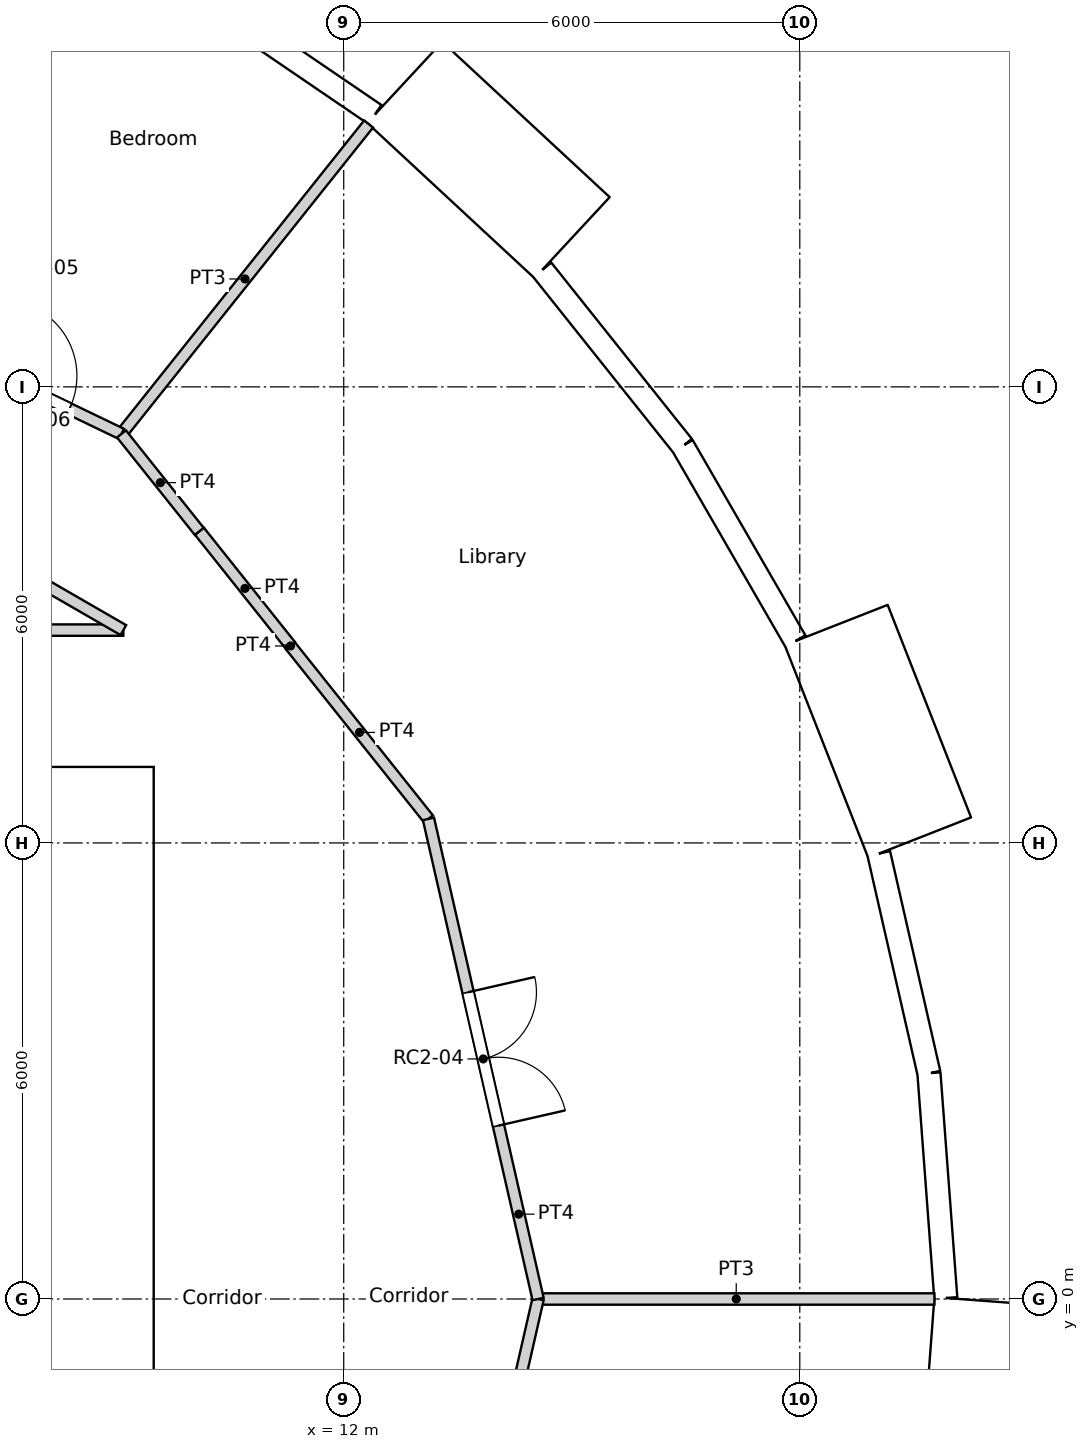
"""IFC4 building model, lengths in metres.
Left out: names, types, materials, properties, quantities, classifications, styles, units other than length and angle.
Written with IfcOpenShell. Run it as: python <this file> out.ifc"""

import sys

from ifc_helpers import new_model, si_unit, direction, frame, frame_2d, origin, origin_2d, place, context, subcontext, project, spatial, rectangle, circle, extrude, element, fill, save


model = new_model("IFC4")
c1 = context("Model", 3, precision=1e-05, world=origin(), true_north=direction((0.0, 1.0)))
c2 = subcontext(c1, "Body", "Model", "MODEL_VIEW")
j1 = project(units=[si_unit("LENGTHUNIT", "METRE"), si_unit("PLANEANGLEUNIT", "RADIAN")], contexts=[c1])
p1 = place(None, origin())
s1 = spatial("IfcSite", under=j1, at=p1, CompositionType="ELEMENT")
p2 = place(p1, origin())
s2 = spatial("IfcBuilding", under=s1, at=p2, CompositionType="ELEMENT")
p3 = place(p2, frame((0.0, 0.0, 241.8)))
s3 = spatial("IfcBuildingStorey", under=s2, at=p3, CompositionType="ELEMENT", Elevation=241.8)
for number, where, z_axis, x_axis in (
    (1, (18.822, 0.0, 0.0), (0.0, 0.0, 1.0), (1.0, 0.0, 0.0)),
    (2, (17.986, 5.548, 0.0), (0.0, 0.0, 1.0), (1.0, 0.0, 0.0)),
    (3, (15.552, 10.603, 0.0), (0.0, 0.0, 1.0), (1.0, 0.0, 0.0)),
    (4, (11.735, 14.716, 0.0), (0.0, 0.0, 1.0), (1.0, 0.0, 0.0)),
):
    element("IfcColumn", number, at=place(p3, frame(where, z_axis=z_axis, x_axis=x_axis)), inside=s3, PredefinedType="COLUMN", context=c2, shape_type="SweptSolid", body=[
        extrude(circle(Radius=0.55, at=origin_2d()), origin(), (0.0, 0.0, 1.0), 3.6),
    ])
p4 = place(p3, frame((19.921, 0.015, 0.0), z_axis=(0.0, 0.0, 1.0), x_axis=(-0.07474897196, 0.997202382263, 0.0)))
e5 = element("IfcWall", 5, at=p4, inside=s3, PredefinedType="SOLIDWALL", context=c2, shape_type="SweptSolid", body=[
    extrude(rectangle(XDim=2.962, YDim=0.3, at=frame_2d((1.481, 0.0))), origin(), (0.0, 0.0, 1.0), 3.25),
])
p5 = place(p4, frame((1.481, 0.0, 1.55)))
e6 = element("IfcOpeningElement", 6, at=p5, cuts=e5, PredefinedType="OPENING", context=c2, shape_type="SweptSolid", body=[
    extrude(circle(Radius=0.9, at=origin_2d()), frame((0.0, 0.16, 0.0), z_axis=(0.0, -1.0, 0.0), x_axis=(1.0, 0.0, 0.0)), (0.0, 0.0, 1.0), 0.32),
])
p6 = place(p3, frame((19.699, 2.969, 0.0), z_axis=(0.0, 0.0, 1.0), x_axis=(-0.222529389789, 0.974925982155, 0.0)))
e7 = element("IfcWall", 7, at=p6, inside=s3, PredefinedType="SOLIDWALL", context=c2, shape_type="SweptSolid", body=[
    extrude(rectangle(XDim=2.962, YDim=0.3, at=frame_2d((1.481, 0.0))), origin(), (0.0, 0.0, 1.0), 3.25),
])
p7 = place(p6, frame((1.481, 0.0, 1.55)))
e8 = element("IfcOpeningElement", 8, at=p7, cuts=e7, PredefinedType="OPENING", context=c2, shape_type="SweptSolid", body=[
    extrude(circle(Radius=0.9, at=origin_2d()), frame((0.0, 0.16, 0.0), z_axis=(0.0, -1.0, 0.0), x_axis=(1.0, 0.0, 0.0)), (0.0, 0.0, 1.0), 0.32),
])
p8 = place(p3, frame((19.576, 6.072, -0.35), z_axis=(0.0, 0.0, 1.0), x_axis=(-0.36537792632, 0.93085926485, 0.0)))
e9 = element("IfcWall", 9, at=p8, inside=s3, PredefinedType="ELEMENTEDWALL", context=c2, shape_type="SweptSolid", body=[
    extrude(rectangle(XDim=3.0, YDim=1.45, at=frame_2d((1.5, 0.0))), origin(), (0.0, 0.0, 1.0), 3.6),
])
p9 = place(p8, frame((1.5, 0.0, 1.9)))
e10 = element("IfcOpeningElement", 10, at=p9, cuts=e9, PredefinedType="OPENING", context=c2, shape_type="SweptSolid", body=[
    extrude(circle(Radius=0.9, at=origin_2d()), frame((0.0, 0.735, 0.0), z_axis=(0.0, -1.0, 0.0), x_axis=(1.0, 0.0, 0.0)), (0.0, 0.0, 1.0), 1.47),
])
p10 = place(p3, frame((17.941, 8.657, 0.0), z_axis=(0.0, 0.0, 1.0), x_axis=(-0.499950756475, 0.86605383268, 0.0)))
e11 = element("IfcWall", 11, at=p10, inside=s3, PredefinedType="SOLIDWALL", context=c2, shape_type="SweptSolid", body=[
    extrude(rectangle(XDim=2.962, YDim=0.3, at=frame_2d((1.481, 0.0))), origin(), (0.0, 0.0, 1.0), 3.25),
])
p11 = place(p10, frame((1.481, 0.0, 1.55)))
e12 = element("IfcOpeningElement", 12, at=p11, cuts=e11, PredefinedType="OPENING", context=c2, shape_type="SweptSolid", body=[
    extrude(circle(Radius=0.9, at=origin_2d()), frame((0.0, 0.16, 0.0), z_axis=(0.0, -1.0, 0.0), x_axis=(1.0, 0.0, 0.0)), (0.0, 0.0, 1.0), 0.32),
])
p12 = place(p3, frame((16.46, 11.222, 0.0), z_axis=(0.0, 0.0, 1.0), x_axis=(-0.623498236992, 0.781824755599, 0.0)))
e13 = element("IfcWall", 13, at=p12, inside=s3, PredefinedType="SOLIDWALL", context=c2, shape_type="SweptSolid", body=[
    extrude(rectangle(XDim=2.962, YDim=0.3, at=frame_2d((1.481, 0.0))), origin(), (0.0, 0.0, 1.0), 3.25),
])
p13 = place(p12, frame((1.481, 0.0, 1.55)))
e14 = element("IfcOpeningElement", 14, at=p13, cuts=e13, PredefinedType="OPENING", context=c2, shape_type="SweptSolid", body=[
    extrude(circle(Radius=0.9, at=origin_2d()), frame((0.0, 0.16, 0.0), z_axis=(0.0, -1.0, 0.0), x_axis=(1.0, 0.0, 0.0)), (0.0, 0.0, 1.0), 0.32),
])
p14 = place(p3, frame((15.003, 13.964, -0.35), z_axis=(0.0, 0.0, 1.0), x_axis=(-0.733022439167, 0.680204457261, 0.0)))
e15 = element("IfcWall", 15, at=p14, inside=s3, PredefinedType="ELEMENTEDWALL", context=c2, shape_type="SweptSolid", body=[
    extrude(rectangle(XDim=3.0, YDim=1.45, at=frame_2d((1.5, 0.0))), origin(), (0.0, 0.0, 1.0), 3.6),
])
p15 = place(p14, frame((1.5, 0.0, 1.9)))
e16 = element("IfcOpeningElement", 16, at=p15, cuts=e15, PredefinedType="OPENING", context=c2, shape_type="SweptSolid", body=[
    extrude(circle(Radius=0.9, at=origin_2d()), frame((0.0, 0.735, 0.0), z_axis=(0.0, -1.0, 0.0), x_axis=(1.0, 0.0, 0.0)), (0.0, 0.0, 1.0), 1.47),
])
p16 = place(p3, frame((12.408, 15.584, 0.0), z_axis=(0.0, 0.0, 1.0), x_axis=(-0.826236061068, 0.563324037646, 0.0)))
e17 = element("IfcWall", 17, at=p16, inside=s3, PredefinedType="SOLIDWALL", context=c2, shape_type="SweptSolid", body=[
    extrude(rectangle(XDim=2.962, YDim=0.3, at=frame_2d((1.481, 0.0))), origin(), (0.0, 0.0, 1.0), 3.25),
])
p17 = place(p16, frame((1.481, 0.0, 1.55)))
e18 = element("IfcOpeningElement", 18, at=p17, cuts=e17, PredefinedType="OPENING", context=c2, shape_type="SweptSolid", body=[
    extrude(circle(Radius=0.9, at=origin_2d()), frame((0.0, 0.16, 0.0), z_axis=(0.0, -1.0, 0.0), x_axis=(1.0, 0.0, 0.0)), (0.0, 0.0, 1.0), 0.32),
])
p18 = place(p3, frame((20.272, -3.023, -0.35), z_axis=(0.0, 0.0, 1.0), x_axis=(0.074785902127, 0.997199613339, 0.0)))
e19 = element("IfcWall", 19, at=p18, inside=s3, PredefinedType="ELEMENTEDWALL", context=c2, shape_type="SweptSolid", body=[
    extrude(rectangle(XDim=3.0, YDim=1.45, at=frame_2d((1.5, 0.0))), origin(), (0.0, 0.0, 1.0), 3.6),
])
p19 = place(p18, frame((1.5, 0.0, 1.9)))
e20 = element("IfcOpeningElement", 20, at=p19, cuts=e19, PredefinedType="OPENING", context=c2, shape_type="SweptSolid", body=[
    extrude(circle(Radius=0.9, at=origin_2d()), frame((0.0, 0.735, 0.0), z_axis=(0.0, -1.0, 0.0), x_axis=(1.0, 0.0, 0.0)), (0.0, 0.0, 1.0), 1.47),
])
p20 = place(p3, frame((-9.5, 6.7, 0.0), z_axis=(0.0, 0.0, 1.0), x_axis=(1.0, 0.0, 0.0)))
e21 = element("IfcWall", 21, at=p20, inside=s3, PredefinedType="SOLIDWALL", context=c2, shape_type="SweptSolid", body=[
    extrude(rectangle(XDim=19.0, YDim=0.6, at=frame_2d((9.5, 0.0))), origin(), (0.0, 0.0, 1.0), 3.6),
])
p21 = place(p20, frame((5.35, 0.0, 0.0)))
e22 = element("IfcOpeningElement", 22, at=p21, cuts=e21, PredefinedType="OPENING", context=c2, shape_type="SweptSolid", body=[
    extrude(rectangle(XDim=1.7, YDim=2.1, at=frame_2d((0.85, 1.05))), frame((0.0, 0.3, 0.0), z_axis=(0.0, -1.0, 0.0), x_axis=(1.0, 0.0, 0.0)), (0.0, 0.0, 1.0), 0.6),
])
p22 = place(p3, frame((9.2, -6.4, 0.0), z_axis=(0.0, 0.0, 1.0), x_axis=(0.0, 1.0, 0.0)))
e23 = element("IfcWall", 23, at=p22, inside=s3, PredefinedType="SOLIDWALL", context=c2, shape_type="SweptSolid", body=[
    extrude(rectangle(XDim=12.8, YDim=0.6, at=frame_2d((6.4, 0.0))), origin(), (0.0, 0.0, 1.0), 3.6),
])
p23 = place(p22, frame((6.4, 0.0, 0.0)))
e24 = element("IfcOpeningElement", 24, at=p23, cuts=e23, PredefinedType="OPENING", context=c2, shape_type="SweptSolid", body=[
    extrude(rectangle(XDim=1.8, YDim=2.1, at=frame_2d((0.9, 1.05))), frame((0.0, 0.3, 0.0), z_axis=(0.0, -1.0, 0.0), x_axis=(1.0, 0.0, 0.0)), (0.0, 0.0, 1.0), 0.6),
])
p24 = place(p3, frame((-4.35, 3.1, 0.0), z_axis=(0.0, 0.0, 1.0), x_axis=(1.0, 0.0, 0.0)))
e25 = element("IfcWall", 25, at=p24, inside=s3, PredefinedType="SOLIDWALL", context=c2, shape_type="SweptSolid", body=[
    extrude(rectangle(XDim=13.25, YDim=0.3, at=frame_2d((6.625, 0.0))), origin(), (0.0, 0.0, 1.0), 3.25),
])
p25 = place(p24, frame((2.95, 0.0, 0.0)))
e26 = element("IfcOpeningElement", 26, at=p25, cuts=e25, PredefinedType="OPENING", context=c2, shape_type="SweptSolid", body=[
    extrude(rectangle(XDim=1.1, YDim=2.1, at=frame_2d((0.55, 1.05))), frame((0.0, 0.15, 0.0), z_axis=(0.0, -1.0, 0.0), x_axis=(1.0, 0.0, 0.0)), (0.0, 0.0, 1.0), 0.3),
])
p26 = place(p24, frame((5.75, 0.0, 0.0)))
e27 = element("IfcOpeningElement", 27, at=p26, cuts=e25, PredefinedType="OPENING", context=c2, shape_type="SweptSolid", body=[
    extrude(rectangle(XDim=1.1, YDim=2.1, at=frame_2d((0.55, 1.05))), frame((0.0, 0.15, 0.0), z_axis=(0.0, -1.0, 0.0), x_axis=(1.0, 0.0, 0.0)), (0.0, 0.0, 1.0), 0.3),
])
p27 = place(p24, frame((8.55, 0.0, 0.0)))
e28 = element("IfcOpeningElement", 28, at=p27, cuts=e25, PredefinedType="OPENING", context=c2, shape_type="SweptSolid", body=[
    extrude(rectangle(XDim=1.1, YDim=2.1, at=frame_2d((0.55, 1.05))), frame((0.0, 0.15, 0.0), z_axis=(0.0, -1.0, 0.0), x_axis=(1.0, 0.0, 0.0)), (0.0, 0.0, 1.0), 0.3),
])
p28 = place(p3, frame((5.85, -0.425, 0.0), z_axis=(0.0, 0.0, 1.0), x_axis=(1.0, 0.0, 0.0)))
e29 = element("IfcWall", 29, at=p28, inside=s3, PredefinedType="SOLIDWALL", context=c2, shape_type="SweptSolid", body=[
    extrude(rectangle(XDim=3.05, YDim=0.15, at=frame_2d((1.525, 0.0))), origin(), (0.0, 0.0, 1.0), 3.25),
])
p29 = place(p28, frame((0.525, 0.0, 0.0)))
e30 = element("IfcOpeningElement", 30, at=p29, cuts=e29, PredefinedType="OPENING", context=c2, shape_type="SweptSolid", body=[
    extrude(rectangle(XDim=0.9, YDim=2.1, at=frame_2d((0.45, 1.05))), frame((0.0, 0.075, 0.0), z_axis=(0.0, -1.0, 0.0), x_axis=(1.0, 0.0, 0.0)), (0.0, 0.0, 1.0), 0.15),
])
p30 = place(p28, frame((2.05, 0.0, 0.0)))
e31 = element("IfcOpeningElement", 31, at=p30, cuts=e29, PredefinedType="OPENING", context=c2, shape_type="SweptSolid", body=[
    extrude(rectangle(XDim=0.9, YDim=2.1, at=frame_2d((0.45, 1.05))), frame((0.0, 0.075, 0.0), z_axis=(0.0, -1.0, 0.0), x_axis=(1.0, 0.0, 0.0)), (0.0, 0.0, 1.0), 0.15),
])
p31 = place(p3, frame((-0.56, 8.8, 0.0), z_axis=(0.0, 0.0, 1.0), x_axis=(1.0, 0.0, 0.0)))
e32 = element("IfcWall", 32, at=p31, inside=s3, PredefinedType="PARTITIONING", context=c2, shape_type="SweptSolid", body=[
    extrude(rectangle(XDim=9.661, YDim=0.15, at=frame_2d((4.83, 0.0))), origin(), (0.0, 0.0, 1.0), 3.25),
])
p32 = place(p31, frame((4.326, 0.0, 0.0)))
e33 = element("IfcOpeningElement", 33, at=p32, cuts=e32, PredefinedType="OPENING", context=c2, shape_type="SweptSolid", body=[
    extrude(rectangle(XDim=1.0, YDim=2.04, at=frame_2d((0.5, 1.02))), frame((0.0, 0.075, 0.0), z_axis=(0.0, -1.0, 0.0), x_axis=(1.0, 0.0, 0.0)), (0.0, 0.0, 1.0), 0.15),
])
p33 = place(p3, frame((10.101, 10.101, 0.0), z_axis=(0.0, 0.0, 1.0), x_axis=(0.623130947784, -0.782117524362, 0.0)))
e34 = element("IfcWall", 34, at=p33, inside=s3, PredefinedType="PARTITIONING", context=c2, shape_type="SweptSolid", body=[
    extrude(rectangle(XDim=1.924, YDim=0.15, at=frame_2d((0.962, 0.0))), origin(), (0.0, 0.0, 1.0), 3.25),
])
p34 = place(p3, frame((11.3, 8.586, 0.0), z_axis=(0.0, 0.0, 1.0), x_axis=(0.0, 1.0, 0.0)))
e35 = element("IfcWall", 35, at=p34, inside=s3, PredefinedType="PARTITIONING", context=c2, shape_type="SweptSolid", body=[
    extrude(rectangle(XDim=0.01, YDim=0.15, at=frame_2d((0.005, 0.0))), origin(), (0.0, 0.0, 1.0), 3.25),
])
p35 = place(p3, frame((11.3, 8.592, 0.0), z_axis=(0.0, 0.0, 1.0), x_axis=(0.623446514299, -0.781866001185, 0.0)))
e36 = element("IfcWall", 36, at=p35, inside=s3, PredefinedType="PARTITIONING", context=c2, shape_type="SweptSolid", body=[
    extrude(rectangle(XDim=2.911, YDim=0.15, at=frame_2d((1.456, 0.0))), origin(), (0.0, 0.0, 1.0), 3.25),
])
p36 = place(p3, frame((13.115, 6.316, 0.0), z_axis=(0.0, 0.0, 1.0), x_axis=(0.222568978642, -0.97491694505, 0.0)))
e37 = element("IfcWall", 37, at=p36, inside=s3, PredefinedType="PARTITIONING", context=c2, shape_type="SweptSolid", body=[
    extrude(rectangle(XDim=6.479, YDim=0.15, at=frame_2d((3.239, 0.0))), origin(), (0.0, 0.0, 1.0), 3.25),
])
p37 = place(p36, frame((2.339, 0.0, 0.0)))
e38 = element("IfcOpeningElement", 38, at=p37, cuts=e37, PredefinedType="OPENING", context=c2, shape_type="SweptSolid", body=[
    extrude(rectangle(XDim=1.8, YDim=2.1, at=frame_2d((0.9, 1.05))), frame((0.0, 0.075, 0.0), z_axis=(0.0, -1.0, 0.0), x_axis=(1.0, 0.0, 0.0)), (0.0, 0.0, 1.0), 0.15),
])
p38 = place(p3, frame((13.115, -6.316, 0.0), z_axis=(0.0, 0.0, 1.0), x_axis=(0.222568978642, 0.97491694505, 0.0)))
e39 = element("IfcWall", 39, at=p38, inside=s3, PredefinedType="PARTITIONING", context=c2, shape_type="SweptSolid", body=[
    extrude(rectangle(XDim=6.479, YDim=0.15, at=frame_2d((3.239, 0.0))), origin(), (0.0, 0.0, 1.0), 3.25),
])
p39 = place(p38, frame((2.34, 0.0, 0.0)))
e40 = element("IfcOpeningElement", 40, at=p39, cuts=e39, PredefinedType="OPENING", context=c2, shape_type="SweptSolid", body=[
    extrude(rectangle(XDim=1.8, YDim=2.1, at=frame_2d((0.9, 1.05))), frame((0.0, 0.075, 0.0), z_axis=(0.0, -1.0, 0.0), x_axis=(1.0, 0.0, 0.0)), (0.0, 0.0, 1.0), 0.15),
])
p40 = place(p3, frame((3.261, 12.171, 0.0), z_axis=(0.0, 0.0, 1.0), x_axis=(0.866066809554, -0.499928276245, 0.0)))
e41 = element("IfcWall", 41, at=p40, inside=s3, PredefinedType="PARTITIONING", context=c2, shape_type="SweptSolid", body=[
    extrude(rectangle(XDim=6.743, YDim=0.15, at=frame_2d((3.371, 0.0))), origin(), (0.0, 0.0, 1.0), 3.25),
])
p41 = place(p3, frame((9.076, 11.381, 0.0), z_axis=(0.0, 0.0, 1.0), x_axis=(0.623805208652, -0.781579849829, 0.0)))
e42 = element("IfcWall", 42, at=p41, inside=s3, PredefinedType="PARTITIONING", context=c2, shape_type="SweptSolid", body=[
    extrude(rectangle(XDim=1.64, YDim=0.15, at=frame_2d((0.82, 0.0))), origin(), (0.0, 0.0, 1.0), 3.25),
])
p42 = place(p3, frame((3.238, 14.191, 0.0), z_axis=(0.0, 0.0, 1.0), x_axis=(0.901070942113, -0.433671716024, 0.0)))
e43 = element("IfcWall", 43, at=p42, inside=s3, PredefinedType="PARTITIONING", context=c2, shape_type="SweptSolid", body=[
    extrude(rectangle(XDim=6.479, YDim=0.15, at=frame_2d((3.239, 0.0))), origin(), (0.0, 0.0, 1.0), 3.25),
])
p43 = place(p42, frame((4.718, 0.0, 0.0)))
e44 = element("IfcOpeningElement", 44, at=p43, cuts=e43, PredefinedType="OPENING", context=c2, shape_type="SweptSolid", body=[
    extrude(rectangle(XDim=1.0, YDim=2.1, at=frame_2d((0.5, 1.05))), frame((0.0, 0.075, 0.0), z_axis=(0.0, -1.0, 0.0), x_axis=(1.0, 0.0, 0.0)), (0.0, 0.0, 1.0), 0.15),
])
p44 = place(p3, frame((9.076, 11.381, 0.0), z_axis=(0.0, 0.0, 1.0), x_axis=(0.623460949534, 0.781854490558, 0.0)))
e45 = element("IfcWall", 45, at=p44, inside=s3, PredefinedType="PARTITIONING", context=c2, shape_type="SweptSolid", body=[
    extrude(rectangle(XDim=5.214, YDim=0.15, at=frame_2d((2.607, 0.0))), origin(), (0.0, 0.0, 1.0), 3.25),
])
p45 = place(p3, frame((14.557, 0.0, 0.0), z_axis=(0.0, 0.0, 1.0), x_axis=(1.0, 0.0, 0.0)))
e46 = element("IfcWall", 46, at=p45, inside=s3, PredefinedType="PARTITIONING", context=c2, shape_type="SweptSolid", body=[
    extrude(rectangle(XDim=5.214, YDim=0.15, at=frame_2d((2.607, 0.0))), origin(), (0.0, 0.0, 1.0), 3.25),
])
p46 = place(p5, origin())
e47 = element("IfcWindow", 47, at=p46, inside=s3, PartitioningType="SINGLE_PANEL", PredefinedType="WINDOW", context=c2, shape_type="SweptSolid", body=[
    extrude(circle(Radius=0.9, at=origin_2d()), frame((0.0, 0.12, 0.0), z_axis=(0.0, -1.0, 0.0), x_axis=(1.0, 0.0, 0.0)), (0.0, 0.0, 1.0), 0.1),
])
fill(e6, e47)
p47 = place(p7, origin())
e48 = element("IfcWindow", 48, at=p47, inside=s3, PartitioningType="SINGLE_PANEL", PredefinedType="WINDOW", context=c2, shape_type="SweptSolid", body=[
    extrude(circle(Radius=0.9, at=origin_2d()), frame((0.0, 0.12, 0.0), z_axis=(0.0, -1.0, 0.0), x_axis=(1.0, 0.0, 0.0)), (0.0, 0.0, 1.0), 0.1),
])
fill(e8, e48)
p48 = place(p9, origin())
e49 = element("IfcWindow", 49, at=p48, inside=s3, PartitioningType="SINGLE_PANEL", PredefinedType="WINDOW", context=c2, shape_type="SweptSolid", body=[
    extrude(circle(Radius=0.9, at=origin_2d()), frame((0.0, 0.695, 0.0), z_axis=(0.0, -1.0, 0.0), x_axis=(1.0, 0.0, 0.0)), (0.0, 0.0, 1.0), 0.1),
])
fill(e10, e49)
p49 = place(p11, origin())
e50 = element("IfcWindow", 50, at=p49, inside=s3, PartitioningType="SINGLE_PANEL", PredefinedType="WINDOW", context=c2, shape_type="SweptSolid", body=[
    extrude(circle(Radius=0.9, at=origin_2d()), frame((0.0, 0.12, 0.0), z_axis=(0.0, -1.0, 0.0), x_axis=(1.0, 0.0, 0.0)), (0.0, 0.0, 1.0), 0.1),
])
fill(e12, e50)
p50 = place(p13, origin())
e51 = element("IfcWindow", 51, at=p50, inside=s3, PartitioningType="SINGLE_PANEL", PredefinedType="WINDOW", context=c2, shape_type="SweptSolid", body=[
    extrude(circle(Radius=0.9, at=origin_2d()), frame((0.0, 0.12, 0.0), z_axis=(0.0, -1.0, 0.0), x_axis=(1.0, 0.0, 0.0)), (0.0, 0.0, 1.0), 0.1),
])
fill(e14, e51)
p51 = place(p15, origin())
e52 = element("IfcWindow", 52, at=p51, inside=s3, PartitioningType="SINGLE_PANEL", PredefinedType="WINDOW", context=c2, shape_type="SweptSolid", body=[
    extrude(circle(Radius=0.9, at=origin_2d()), frame((0.0, 0.695, 0.0), z_axis=(0.0, -1.0, 0.0), x_axis=(1.0, 0.0, 0.0)), (0.0, 0.0, 1.0), 0.1),
])
fill(e16, e52)
p52 = place(p17, origin())
e53 = element("IfcWindow", 53, at=p52, inside=s3, PartitioningType="SINGLE_PANEL", PredefinedType="WINDOW", context=c2, shape_type="SweptSolid", body=[
    extrude(circle(Radius=0.9, at=origin_2d()), frame((0.0, 0.12, 0.0), z_axis=(0.0, -1.0, 0.0), x_axis=(1.0, 0.0, 0.0)), (0.0, 0.0, 1.0), 0.1),
])
fill(e18, e53)
p53 = place(p19, origin())
e54 = element("IfcWindow", 54, at=p53, inside=s3, PartitioningType="SINGLE_PANEL", PredefinedType="WINDOW", context=c2, shape_type="SweptSolid", body=[
    extrude(circle(Radius=0.9, at=origin_2d()), frame((0.0, 0.695, 0.0), z_axis=(0.0, -1.0, 0.0), x_axis=(1.0, 0.0, 0.0)), (0.0, 0.0, 1.0), 0.1),
])
fill(e20, e54)
p54 = place(p23, origin())
e55 = element("IfcDoor", 55, at=p54, inside=s3, OperationType="DOUBLE_DOOR_SINGLE_SWING", PredefinedType="DOOR", context=c2, shape_type="SweptSolid", body=[
    extrude(rectangle(XDim=1.8, YDim=2.1, at=frame_2d((0.9, 1.05))), frame((0.0, 0.025, 0.0), z_axis=(0.0, -1.0, 0.0), x_axis=(1.0, 0.0, 0.0)), (0.0, 0.0, 1.0), 0.05),
])
fill(e24, e55)
p55 = place(p30, origin())
e56 = element("IfcDoor", 56, at=p55, inside=s3, OperationType="SINGLE_SWING_LEFT", PredefinedType="DOOR", context=c2, shape_type="SweptSolid", body=[
    extrude(rectangle(XDim=0.9, YDim=2.1, at=frame_2d((0.45, 1.05))), frame((0.0, 0.025, 0.0), z_axis=(0.0, -1.0, 0.0), x_axis=(1.0, 0.0, 0.0)), (0.0, 0.0, 1.0), 0.05),
])
fill(e31, e56)
p56 = place(p37, origin())
e57 = element("IfcDoor", 57, at=p56, inside=s3, OperationType="DOUBLE_DOOR_SINGLE_SWING", PredefinedType="DOOR", context=c2, shape_type="SweptSolid", body=[
    extrude(rectangle(XDim=1.8, YDim=2.1, at=frame_2d((0.9, 1.05))), frame((0.0, 0.025, 0.0), z_axis=(0.0, -1.0, 0.0), x_axis=(1.0, 0.0, 0.0)), (0.0, 0.0, 1.0), 0.05),
])
fill(e38, e57)
p57 = place(p43, origin())
e58 = element("IfcDoor", 58, at=p57, inside=s3, OperationType="SINGLE_SWING_LEFT", PredefinedType="DOOR", context=c2, shape_type="SweptSolid", body=[
    extrude(rectangle(XDim=1.0, YDim=2.1, at=frame_2d((0.5, 1.05))), frame((0.0, 0.025, 0.0), z_axis=(0.0, -1.0, 0.0), x_axis=(1.0, 0.0, 0.0)), (0.0, 0.0, 1.0), 0.05),
])
fill(e44, e58)
save(model, sys.argv[1])
